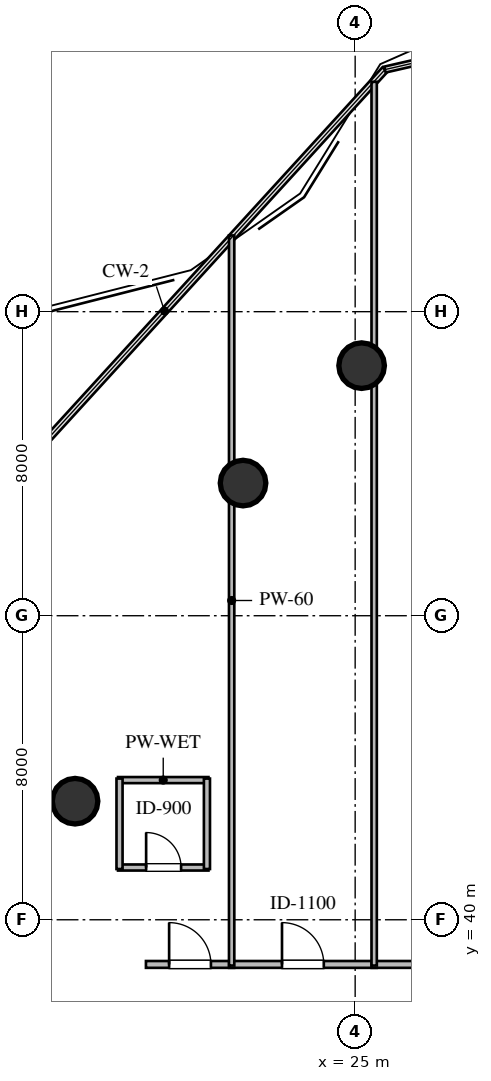
"""IFC4 building model, lengths in metres.
Left out: names, types, materials, properties, quantities, classifications, styles, units other than length and angle.
Written with IfcOpenShell. Run it as: python <this file> out.ifc"""

import sys

from ifc_helpers import new_model, si_unit, direction, frame, frame_2d, origin, origin_2d, place, context, subcontext, project, spatial, rectangle, circle, extrude, element, fill, save


model = new_model("IFC4")
c1 = context("Model", 3, precision=1e-05, world=origin(), true_north=direction((0.0, 1.0)))
c2 = subcontext(c1, "Body", "Model", "MODEL_VIEW")
j1 = project(units=[si_unit("LENGTHUNIT", "METRE"), si_unit("PLANEANGLEUNIT", "RADIAN")], contexts=[c1])
p1 = place(None, origin())
s1 = spatial("IfcSite", under=j1, at=p1, CompositionType="ELEMENT")
p2 = place(p1, origin())
s2 = spatial("IfcBuilding", under=s1, at=p2, CompositionType="ELEMENT")
p3 = place(p2, frame((0.0, 0.0, 160.2)))
s3 = spatial("IfcBuildingStorey", under=s2, at=p3, CompositionType="ELEMENT", Elevation=160.2)
for number, where, z_axis, x_axis in (
    (1, (25.17, 54.58, 0.0), (0.0, 0.0, 1.0), (1.0, 0.0, 0.0)),
    (2, (22.05, 51.49, 0.0), (0.0, 0.0, 1.0), (1.0, 0.0, 0.0)),
    (3, (17.63, 43.12, 0.0), (0.0, 0.0, 1.0), (1.0, 0.0, 0.0)),
):
    element("IfcColumn", number, at=place(p3, frame(where, z_axis=z_axis, x_axis=x_axis)), inside=s3, PredefinedType="COLUMN", context=c2, shape_type="SweptSolid", body=[
        extrude(circle(Radius=0.6, at=origin_2d()), origin(), (0.0, 0.0, 1.0), 3.6),
    ])
p4 = place(p3, frame((18.76, 41.375, 0.0), z_axis=(0.0, 0.0, 1.0), x_axis=(1.0, 0.0, 0.0)))
e4 = element("IfcWall", 4, at=p4, inside=s3, PredefinedType="PLUMBINGWALL", context=c2, shape_type="SweptSolid", body=[
    extrude(rectangle(XDim=2.38, YDim=0.16, at=frame_2d((1.19, 0.0))), origin(), (0.0, 0.0, 1.0), 3.36),
])
p5 = place(p4, frame((0.74, 0.0, 0.0)))
e5 = element("IfcOpeningElement", 5, at=p5, cuts=e4, PredefinedType="OPENING", context=c2, shape_type="SweptSolid", body=[
    extrude(rectangle(XDim=0.92, YDim=2.1, at=frame_2d((0.46, 1.05))), frame((0.0, 0.09, 0.0), z_axis=(0.0, -1.0, 0.0), x_axis=(1.0, 0.0, 0.0)), (0.0, 0.0, 1.0), 0.18),
])
p6 = place(p3, frame((18.76, 43.675, 0.0), z_axis=(0.0, 0.0, 1.0), x_axis=(1.0, 0.0, 0.0)))
e6 = element("IfcWall", 6, at=p6, inside=s3, PredefinedType="PLUMBINGWALL", context=c2, shape_type="SweptSolid", body=[
    extrude(rectangle(XDim=2.38, YDim=0.16, at=frame_2d((1.19, 0.0))), origin(), (0.0, 0.0, 1.0), 3.36),
])
for number, where, z_axis, x_axis in (
    (7, (18.8, 41.335, 0.0), (0.0, 0.0, 1.0), (0.0, 1.0, 0.0)),
    (8, (21.1, 41.335, 0.0), (0.0, 0.0, 1.0), (0.0, 1.0, 0.0)),
):
    element("IfcWall", number, at=place(p3, frame(where, z_axis=z_axis, x_axis=x_axis)), inside=s3, PredefinedType="PLUMBINGWALL", context=c2, shape_type="SweptSolid", body=[
        extrude(rectangle(XDim=2.38, YDim=0.16, at=frame_2d((1.19, 0.0))), origin(), (0.0, 0.0, 1.0), 3.36),
    ])
p7 = place(p3, frame((19.495, 38.825, 0.0), z_axis=(0.0, 0.0, 1.0), x_axis=(1.0, 0.0, 0.0)))
e9 = element("IfcWall", 9, at=p7, inside=s3, PredefinedType="PARTITIONING", context=c2, shape_type="SweptSolid", body=[
    extrude(rectangle(XDim=2.32, YDim=0.18, at=frame_2d((1.16, 0.0))), origin(), (0.0, 0.0, 1.0), 3.36),
])
p8 = place(p7, frame((0.61, 0.0, 0.0)))
e10 = element("IfcOpeningElement", 10, at=p8, cuts=e9, PredefinedType="OPENING", context=c2, shape_type="SweptSolid", body=[
    extrude(rectangle(XDim=1.1, YDim=2.1, at=frame_2d((0.55, 1.05))), frame((0.0, 0.1, 0.0), z_axis=(0.0, -1.0, 0.0), x_axis=(1.0, 0.0, 0.0)), (0.0, 0.0, 1.0), 0.2),
])
p9 = place(p3, frame((21.685, 38.825, 0.0), z_axis=(0.0, 0.0, 1.0), x_axis=(1.0, 0.0, 0.0)))
e11 = element("IfcWall", 11, at=p9, inside=s3, PredefinedType="PARTITIONING", context=c2, shape_type="SweptSolid", body=[
    extrude(rectangle(XDim=3.88, YDim=0.18, at=frame_2d((1.94, 0.0))), origin(), (0.0, 0.0, 1.0), 3.36),
])
p10 = place(p9, frame((1.39, 0.0, 0.0)))
e12 = element("IfcOpeningElement", 12, at=p10, cuts=e11, PredefinedType="OPENING", context=c2, shape_type="SweptSolid", body=[
    extrude(rectangle(XDim=1.1, YDim=2.1, at=frame_2d((0.55, 1.05))), frame((0.0, 0.1, 0.0), z_axis=(0.0, -1.0, 0.0), x_axis=(1.0, 0.0, 0.0)), (0.0, 0.0, 1.0), 0.2),
])
p11 = place(p3, frame((25.435, 38.825, 0.0), z_axis=(0.0, 0.0, 1.0), x_axis=(1.0, 0.0, 0.0)))
e13 = element("IfcWall", 13, at=p11, inside=s3, PredefinedType="PARTITIONING", context=c2, shape_type="SweptSolid", body=[
    extrude(rectangle(XDim=4.13, YDim=0.18, at=frame_2d((2.065, 0.0))), origin(), (0.0, 0.0, 1.0), 3.36),
])
p12 = place(p11, frame((1.515, 0.0, 0.0)))
e14 = element("IfcOpeningElement", 14, at=p12, cuts=e13, PredefinedType="OPENING", context=c2, shape_type="SweptSolid", body=[
    extrude(rectangle(XDim=1.1, YDim=2.1, at=frame_2d((0.55, 1.05))), frame((0.0, 0.1, 0.0), z_axis=(0.0, -1.0, 0.0), x_axis=(1.0, 0.0, 0.0)), (0.0, 0.0, 1.0), 0.2),
])
p13 = place(p3, frame((21.75, 58.006, 0.0), z_axis=(0.0, 0.0, 1.0), x_axis=(0.0, -1.0, 0.0)))
e15 = element("IfcWall", 15, at=p13, inside=s3, PredefinedType="PARTITIONING", context=c2, shape_type="SweptSolid", body=[
    extrude(rectangle(XDim=19.211, YDim=0.14, at=frame_2d((9.605, 0.0))), origin(), (0.0, 0.0, 1.0), 2.806),
])
p14 = place(p3, frame((25.5, 62.049, 0.0), z_axis=(0.0, 0.0, 1.0), x_axis=(0.0, -1.0, 0.0)))
e16 = element("IfcWall", 16, at=p14, inside=s3, PredefinedType="PARTITIONING", context=c2, shape_type="SweptSolid", body=[
    extrude(rectangle(XDim=23.254, YDim=0.14, at=frame_2d((11.627, 0.0))), origin(), (0.0, 0.0, 1.0), 2.806),
])
p15 = place(p5, origin())
e17 = element("IfcDoor", 17, at=p15, inside=s3, OperationType="SINGLE_SWING_LEFT", PredefinedType="DOOR", context=c2, shape_type="SweptSolid", body=[
    extrude(rectangle(XDim=0.92, YDim=2.1, at=frame_2d((0.46, 1.05))), frame((0.0, 0.025, 0.0), z_axis=(0.0, -1.0, 0.0), x_axis=(1.0, 0.0, 0.0)), (0.0, 0.0, 1.0), 0.05),
])
fill(e5, e17)
p16 = place(p8, origin())
e18 = element("IfcDoor", 18, at=p16, inside=s3, OperationType="SINGLE_SWING_LEFT", PredefinedType="DOOR", context=c2, shape_type="SweptSolid", body=[
    extrude(rectangle(XDim=1.1, YDim=2.1, at=frame_2d((0.55, 1.05))), frame((0.0, 0.025, 0.0), z_axis=(0.0, -1.0, 0.0), x_axis=(1.0, 0.0, 0.0)), (0.0, 0.0, 1.0), 0.05),
])
fill(e10, e18)
p17 = place(p10, origin())
e19 = element("IfcDoor", 19, at=p17, inside=s3, OperationType="SINGLE_SWING_LEFT", PredefinedType="DOOR", context=c2, shape_type="SweptSolid", body=[
    extrude(rectangle(XDim=1.1, YDim=2.1, at=frame_2d((0.55, 1.05))), frame((0.0, 0.025, 0.0), z_axis=(0.0, -1.0, 0.0), x_axis=(1.0, 0.0, 0.0)), (0.0, 0.0, 1.0), 0.05),
])
fill(e12, e19)
save(model, sys.argv[1])
